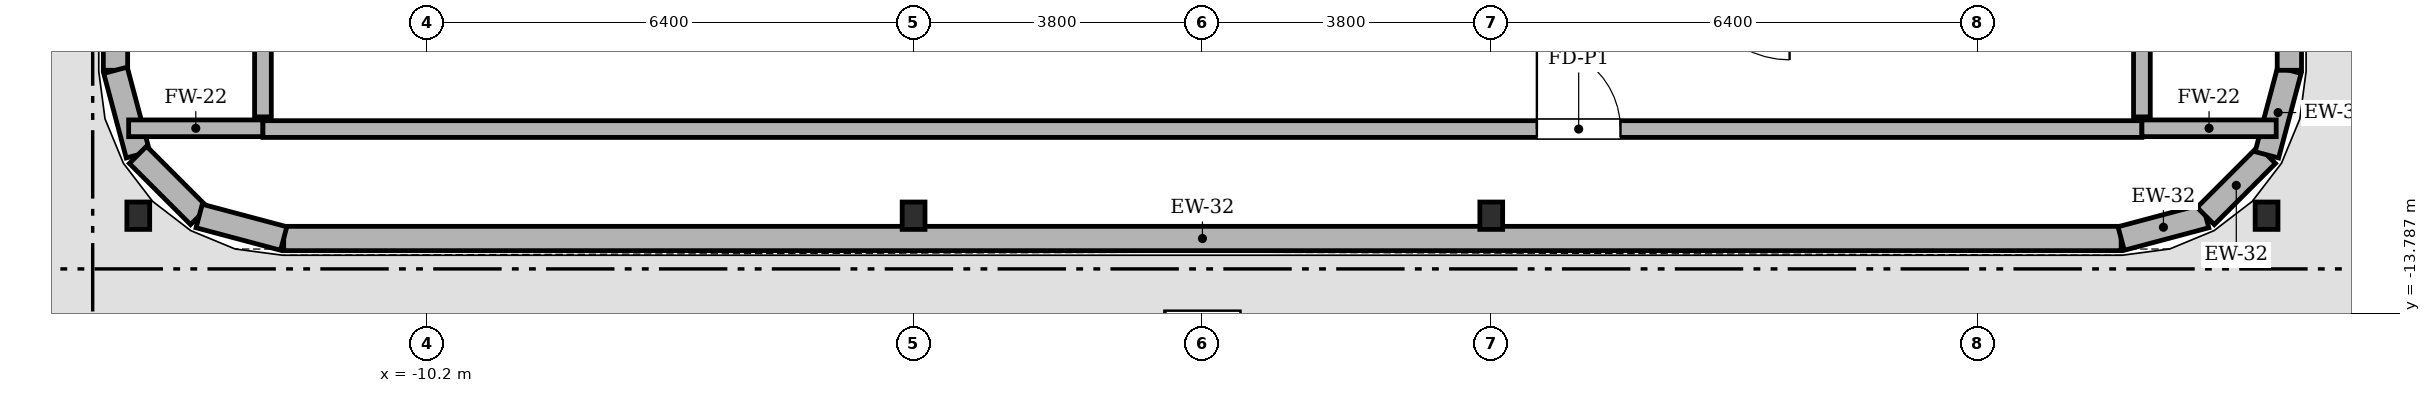
"""IFC4 building model, lengths in metres.
Left out: names, types, materials, properties, quantities, classifications, styles, units other than length and angle.
Written with IfcOpenShell. Run it as: python <this file> out.ifc"""

import sys

from ifc_helpers import new_model, si_unit, direction, frame, frame_2d, origin, origin_2d, place, context, subcontext, project, spatial, rectangle, i_section, extrude, element, fill, save


model = new_model("IFC4")
c1 = context("Model", 3, precision=1e-05, world=origin(), true_north=direction((0.0, 1.0)))
c2 = subcontext(c1, "Body", "Model", "MODEL_VIEW")
j1 = project(units=[si_unit("LENGTHUNIT", "METRE"), si_unit("PLANEANGLEUNIT", "RADIAN")], contexts=[c1])
p1 = place(None, origin())
s1 = spatial("IfcSite", under=j1, at=p1, CompositionType="ELEMENT")
p2 = place(p1, origin())
s2 = spatial("IfcBuilding", under=s1, at=p2, CompositionType="ELEMENT")
p3 = place(p2, frame((0.0, 0.0, 361.8)))
s3 = spatial("IfcBuildingStorey", under=s2, at=p3, CompositionType="ELEMENT", Elevation=361.8)
for number, where, z_axis, x_axis in (
    (1, (-3.8, -12.5, 0.0), (0.0, 0.0, 1.0), (1.0, 0.0, 0.0)),
    (2, (3.8, -12.5, 0.0), (0.0, 0.0, 1.0), (1.0, 0.0, 0.0)),
    (3, (-14.0, -12.5, 0.0), (0.0, 0.0, 1.0), (1.0, 0.0, 0.0)),
    (4, (14.0, -12.5, 0.0), (0.0, 0.0, 1.0), (1.0, 0.0, 0.0)),
):
    element("IfcColumn", number, at=place(p3, frame(where, z_axis=z_axis, x_axis=x_axis)), inside=s3, PredefinedType="COLUMN", context=c2, shape_type="SweptSolid", body=[
        extrude(i_section(OverallWidth=0.3, OverallDepth=0.36, WebThickness=0.012, FlangeThickness=0.022, FilletRadius=0.018, at=origin_2d()), origin(), (0.0, 0.0, 1.0), 4.498),
    ])
p4 = place(p3, frame((-12.087, -12.8, 0.0), z_axis=(0.0, 0.0, 1.0), x_axis=(1.0, 0.0, 0.0)))
e5 = element("IfcWall", 5, at=p4, inside=s3, PredefinedType="SOLIDWALL", context=c2, shape_type="SweptSolid", body=[
    extrude(rectangle(XDim=24.174, YDim=0.32, at=frame_2d((12.087, 0.0))), origin(), (0.0, 0.0, 1.0), 2.994),
])
p5 = place(p3, frame((12.087, -12.8, 0.0), z_axis=(0.0, 0.0, 1.0), x_axis=(0.966336954372, 0.25727979053, 0.0)))
e6 = element("IfcWall", 6, at=p5, inside=s3, PredefinedType="SOLIDWALL", context=c2, shape_type="SweptSolid", body=[
    extrude(rectangle(XDim=1.151, YDim=0.32, at=frame_2d((0.576, 0.0))), origin(), (0.0, 0.0, 1.0), 2.994),
])
p6 = place(p3, frame((13.199, -12.504, 0.0), z_axis=(0.0, 0.0, 1.0), x_axis=(0.707106781187, 0.707106781187, 0.0)))
e7 = element("IfcWall", 7, at=p6, inside=s3, PredefinedType="SOLIDWALL", context=c2, shape_type="SweptSolid", body=[
    extrude(rectangle(XDim=1.138, YDim=0.32, at=frame_2d((0.569, 0.0))), origin(), (0.0, 0.0, 1.0), 2.994),
])
p7 = place(p3, frame((14.004, -11.699, 0.0), z_axis=(0.0, 0.0, 1.0), x_axis=(0.25727979053, 0.966336954372, 0.0)))
e8 = element("IfcWall", 8, at=p7, inside=s3, PredefinedType="SOLIDWALL", context=c2, shape_type="SweptSolid", body=[
    extrude(rectangle(XDim=1.151, YDim=0.32, at=frame_2d((0.576, 0.0))), origin(), (0.0, 0.0, 1.0), 2.994),
])
for number, where, z_axis, x_axis in (
    (9, (14.3, -10.587, 0.0), (0.0, 0.0, 1.0), (0.0, 1.0, 0.0)),
    (10, (-14.3, 10.587, 0.0), (0.0, 0.0, 1.0), (0.0, -1.0, 0.0)),
):
    element("IfcWall", number, at=place(p3, frame(where, z_axis=z_axis, x_axis=x_axis)), inside=s3, PredefinedType="SOLIDWALL", context=c2, shape_type="SweptSolid", body=[
        extrude(rectangle(XDim=21.174, YDim=0.32, at=frame_2d((10.587, 0.0))), origin(), (0.0, 0.0, 1.0), 2.994),
    ])
p8 = place(p3, frame((-14.3, -10.587, 0.0), z_axis=(0.0, 0.0, 1.0), x_axis=(0.25727979053, -0.966336954372, 0.0)))
e11 = element("IfcWall", 11, at=p8, inside=s3, PredefinedType="SOLIDWALL", context=c2, shape_type="SweptSolid", body=[
    extrude(rectangle(XDim=1.151, YDim=0.32, at=frame_2d((0.576, 0.0))), origin(), (0.0, 0.0, 1.0), 2.994),
])
p9 = place(p3, frame((-14.004, -11.699, 0.0), z_axis=(0.0, 0.0, 1.0), x_axis=(0.707106781187, -0.707106781187, 0.0)))
e12 = element("IfcWall", 12, at=p9, inside=s3, PredefinedType="SOLIDWALL", context=c2, shape_type="SweptSolid", body=[
    extrude(rectangle(XDim=1.138, YDim=0.32, at=frame_2d((0.569, 0.0))), origin(), (0.0, 0.0, 1.0), 2.994),
])
p10 = place(p3, frame((-13.199, -12.504, 0.0), z_axis=(0.0, 0.0, 1.0), x_axis=(0.966336954372, -0.25727979053, 0.0)))
e13 = element("IfcWall", 13, at=p10, inside=s3, PredefinedType="SOLIDWALL", context=c2, shape_type="SweptSolid", body=[
    extrude(rectangle(XDim=1.151, YDim=0.32, at=frame_2d((0.576, 0.0))), origin(), (0.0, 0.0, 1.0), 2.994),
])
p11 = place(p3, frame((-14.127, -11.35, 0.0), z_axis=(0.0, 0.0, 1.0), x_axis=(1.0, 0.0, 0.0)))
e14 = element("IfcWall", 14, at=p11, inside=s3, PredefinedType="SOLIDWALL", context=c2, shape_type="SweptSolid", body=[
    extrude(rectangle(XDim=1.767, YDim=0.22, at=frame_2d((0.883, 0.0))), origin(), (0.0, 0.0, 1.0), 2.994),
])
p12 = place(p3, frame((-12.36, -11.36, 0.0), z_axis=(0.0, 0.0, 1.0), x_axis=(1.0, 0.0, 0.0)))
e15 = element("IfcWall", 15, at=p12, inside=s3, PredefinedType="SOLIDWALL", context=c2, shape_type="SweptSolid", body=[
    extrude(rectangle(XDim=24.72, YDim=0.22, at=frame_2d((12.36, 0.0))), origin(), (0.0, 0.0, 1.0), 2.994),
])
p13 = place(p12, frame((16.76, 0.0, 0.0)))
e16 = element("IfcOpeningElement", 16, at=p13, cuts=e15, PredefinedType="OPENING", context=c2, shape_type="SweptSolid", body=[
    extrude(rectangle(XDim=1.1, YDim=2.2, at=frame_2d((0.55, 1.1))), frame((0.0, 0.12, 0.0), z_axis=(0.0, -1.0, 0.0), x_axis=(1.0, 0.0, 0.0)), (0.0, 0.0, 1.0), 0.24),
])
p14 = place(p3, frame((12.36, -11.35, 0.0), z_axis=(0.0, 0.0, 1.0), x_axis=(1.0, 0.0, 0.0)))
e17 = element("IfcWall", 17, at=p14, inside=s3, PredefinedType="SOLIDWALL", context=c2, shape_type="SweptSolid", body=[
    extrude(rectangle(XDim=1.767, YDim=0.22, at=frame_2d((0.883, 0.0))), origin(), (0.0, 0.0, 1.0), 2.994),
])
p15 = place(p3, frame((-12.36, 11.2, 0.0), z_axis=(0.0, 0.0, 1.0), x_axis=(0.0, -1.0, 0.0)))
e18 = element("IfcWall", 18, at=p15, inside=s3, PredefinedType="SOLIDWALL", context=c2, shape_type="SweptSolid", body=[
    extrude(rectangle(XDim=22.4, YDim=0.22, at=frame_2d((11.2, 0.0))), origin(), (0.0, 0.0, 1.0), 2.994),
])
p16 = place(p15, frame((10.65, 0.0, 0.0)))
e19 = element("IfcOpeningElement", 19, at=p16, cuts=e18, PredefinedType="OPENING", context=c2, shape_type="SweptSolid", body=[
    extrude(rectangle(XDim=1.1, YDim=2.2, at=frame_2d((0.55, 1.1))), frame((0.0, 0.12, 0.0), z_axis=(0.0, -1.0, 0.0), x_axis=(1.0, 0.0, 0.0)), (0.0, 0.0, 1.0), 0.24),
])
p17 = place(p3, frame((12.36, -11.2, 0.0), z_axis=(0.0, 0.0, 1.0), x_axis=(0.0, 1.0, 0.0)))
e20 = element("IfcWall", 20, at=p17, inside=s3, PredefinedType="SOLIDWALL", context=c2, shape_type="SweptSolid", body=[
    extrude(rectangle(XDim=22.4, YDim=0.22, at=frame_2d((11.2, 0.0))), origin(), (0.0, 0.0, 1.0), 2.994),
])
p18 = place(p17, frame((10.65, 0.0, 0.0)))
e21 = element("IfcOpeningElement", 21, at=p18, cuts=e20, PredefinedType="OPENING", context=c2, shape_type="SweptSolid", body=[
    extrude(rectangle(XDim=1.1, YDim=2.2, at=frame_2d((0.55, 1.1))), frame((0.0, 0.12, 0.0), z_axis=(0.0, -1.0, 0.0), x_axis=(1.0, 0.0, 0.0)), (0.0, 0.0, 1.0), 0.24),
])
p19 = place(p3, frame((0.0, 0.0, -0.25)))
p20 = place(p19, frame((0.0, -14.35, 0.0)))
p21 = place(p20, frame((0.0, 0.0, 0.25)))
e22 = element("IfcDoor", 22, at=p21, inside=s3, OperationType="SINGLE_SWING_LEFT", PredefinedType="TRAPDOOR", context=c2, shape_type="SweptSolid", body=[
    extrude(rectangle(XDim=1.0, YDim=1.2, at=origin_2d()), origin(), (0.0, 0.0, 1.0), 0.05),
])
p22 = place(p13, origin())
e23 = element("IfcDoor", 23, at=p22, inside=s3, OperationType="SINGLE_SWING_LEFT", PredefinedType="DOOR", context=c2, shape_type="SweptSolid", body=[
    extrude(rectangle(XDim=1.1, YDim=2.2, at=frame_2d((0.55, 1.1))), frame((0.0, 0.025, 0.0), z_axis=(0.0, -1.0, 0.0), x_axis=(1.0, 0.0, 0.0)), (0.0, 0.0, 1.0), 0.05),
])
fill(e16, e23)
save(model, sys.argv[1])
